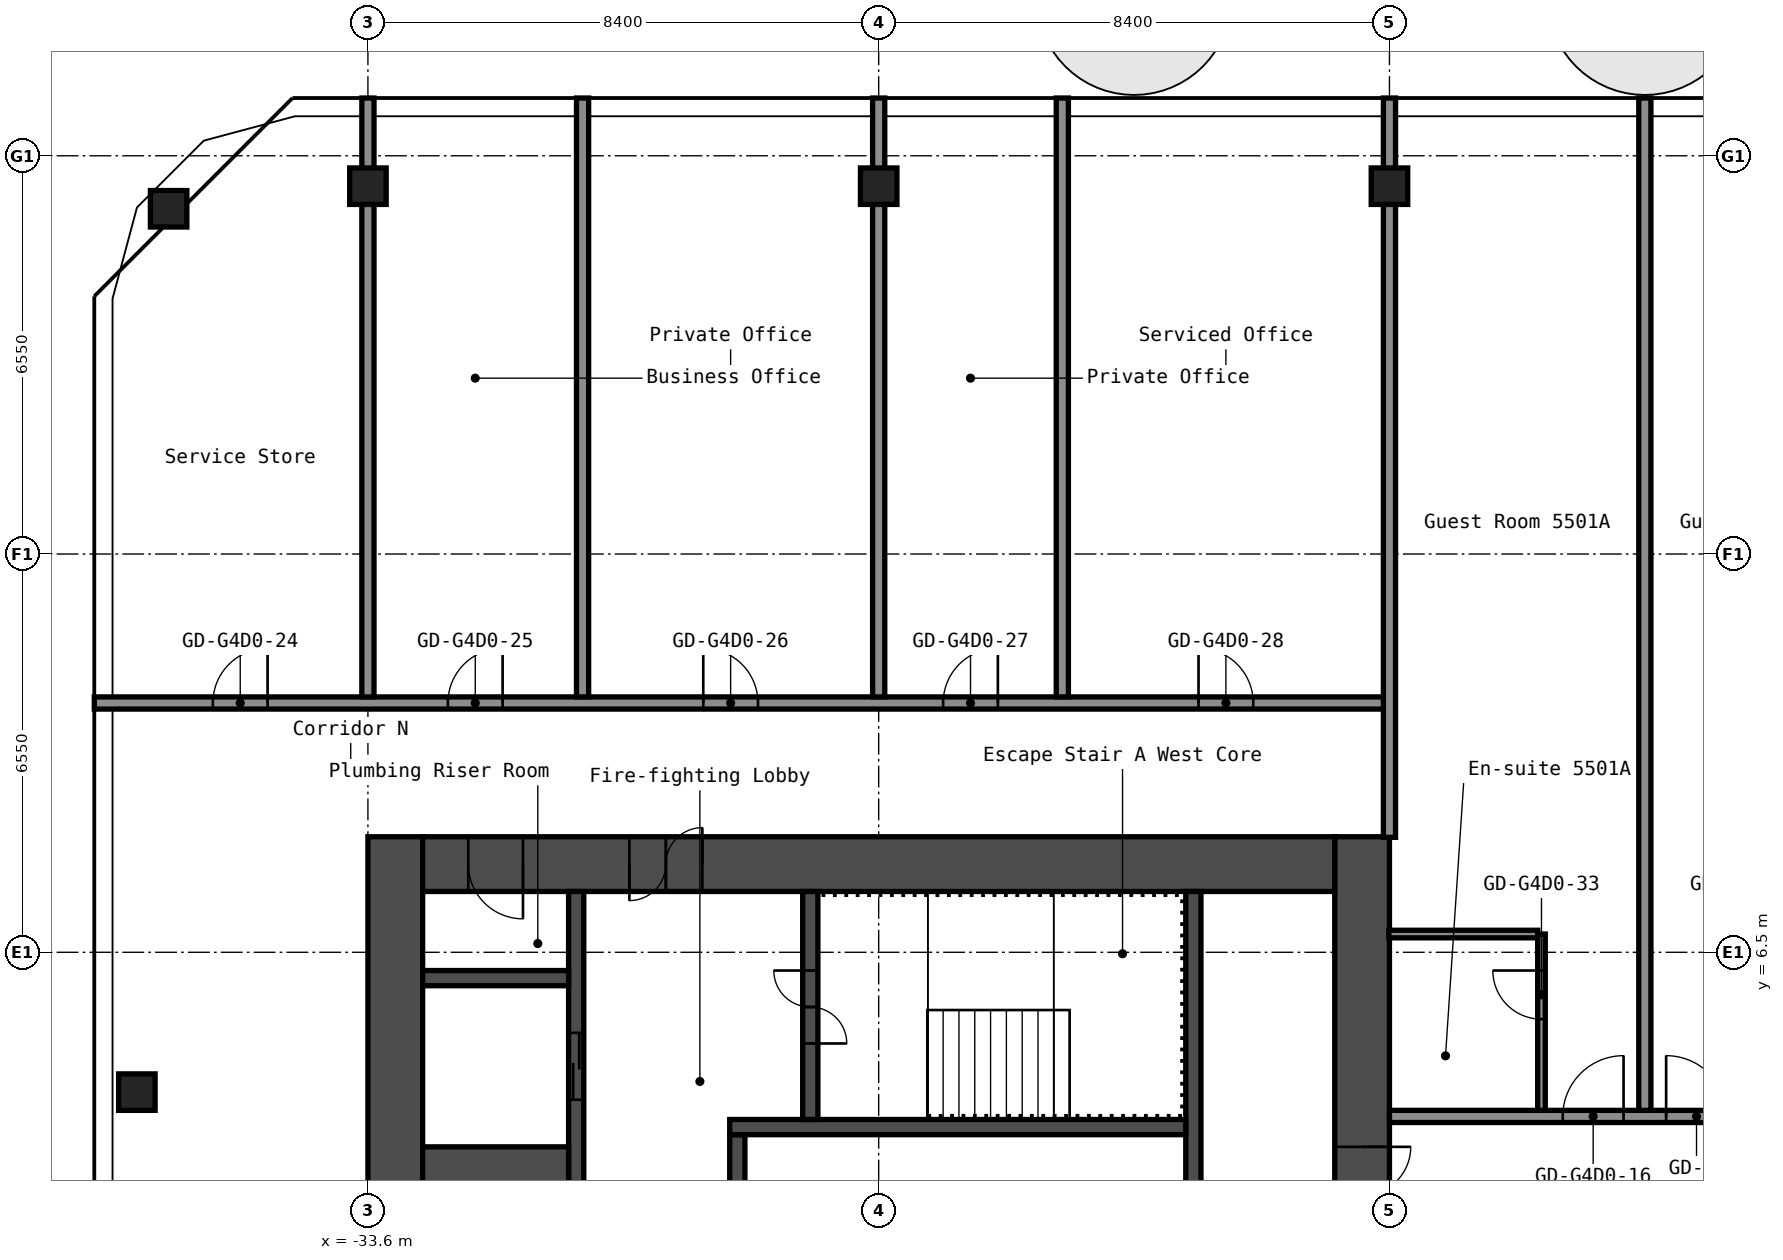
"""IFC4 building model, lengths in metres.
Left out: names, types, materials, properties, quantities, classifications, styles, units other than length and angle.
Written with IfcOpenShell. Run it as: python <this file> out.ifc"""

import sys

from ifc_helpers import new_model, si_unit, direction, frame, frame_2d, origin, origin_2d, place, context, subcontext, project, spatial, rectangle, hollow_rectangle, extrude, element, fill, save


model = new_model("IFC4")
c1 = context("Model", 3, precision=1e-05, world=origin(), true_north=direction((0.0, 1.0)))
c2 = subcontext(c1, "Body", "Model", "MODEL_VIEW")
j1 = project(units=[si_unit("LENGTHUNIT", "METRE"), si_unit("PLANEANGLEUNIT", "RADIAN")], contexts=[c1])
p1 = place(None, origin())
s1 = spatial("IfcSite", under=j1, at=p1, CompositionType="ELEMENT")
p2 = place(p1, origin())
s2 = spatial("IfcBuilding", under=s1, at=p2, CompositionType="ELEMENT")
p3 = place(p2, frame((0.0, 0.0, 196.2)))
s3 = spatial("IfcBuildingStorey", under=s2, at=p3, CompositionType="ELEMENT", Elevation=196.2)
for number, where, z_axis, x_axis in (
    (1, (-37.4, 4.2, 0.0), (0.0, 0.0, 1.0), (1.0, 0.0, 0.0)),
    (2, (-36.878, 18.729, 0.0), (0.0, 0.0, 1.0), (1.0, 0.0, 0.0)),
    (3, (-33.6, 19.1, 0.0), (0.0, 0.0, 1.0), (1.0, 0.0, 0.0)),
    (4, (-25.2, 19.1, 0.0), (0.0, 0.0, 1.0), (1.0, 0.0, 0.0)),
    (5, (-16.8, 19.1, 0.0), (0.0, 0.0, 1.0), (1.0, 0.0, 0.0)),
):
    element("IfcColumn", number, at=place(p3, frame(where, z_axis=z_axis, x_axis=x_axis)), inside=s3, PredefinedType="COLUMN", context=c2, shape_type="SweptSolid", body=[
        extrude(hollow_rectangle(XDim=0.6, YDim=0.6, WallThickness=0.025, InnerFilletRadius=0.038, OuterFilletRadius=0.062, at=origin_2d()), origin(), (0.0, 0.0, 1.0), 2.75),
    ])
p4 = place(p3, frame((-17.25, -8.4, 0.0), z_axis=(0.0, 0.0, 1.0), x_axis=(0.0, 1.0, 0.0)))
e6 = element("IfcWall", 6, at=p4, inside=s3, PredefinedType="SHEAR", context=c2, shape_type="SweptSolid", body=[
    extrude(rectangle(XDim=16.8, YDim=0.9, at=frame_2d((8.4, 0.0))), origin(), (0.0, 0.0, 1.0), 2.75),
])
p5 = place(p4, frame((10.1, 0.0, 0.0)))
e7 = element("IfcOpeningElement", 7, at=p5, cuts=e6, PredefinedType="OPENING", context=c2, shape_type="SweptSolid", body=[
    extrude(rectangle(XDim=1.6, YDim=2.1, at=frame_2d((0.8, 1.05))), frame((0.0, 0.46, 0.0), z_axis=(0.0, -1.0, 0.0), x_axis=(1.0, 0.0, 0.0)), (0.0, 0.0, 1.0), 0.92),
])
p6 = place(p3, frame((-33.15, -8.4, 0.0), z_axis=(0.0, 0.0, 1.0), x_axis=(0.0, 1.0, 0.0)))
e8 = element("IfcWall", 8, at=p6, inside=s3, PredefinedType="SHEAR", context=c2, shape_type="SweptSolid", body=[
    extrude(rectangle(XDim=16.8, YDim=0.9, at=frame_2d((8.4, 0.0))), origin(), (0.0, 0.0, 1.0), 2.75),
])
p7 = place(p3, frame((-32.7, 7.95, 0.0), z_axis=(0.0, 0.0, 1.0), x_axis=(1.0, 0.0, 0.0)))
e9 = element("IfcWall", 9, at=p7, inside=s3, PredefinedType="SHEAR", context=c2, shape_type="SweptSolid", body=[
    extrude(rectangle(XDim=15.0, YDim=0.9, at=frame_2d((7.5, 0.0))), origin(), (0.0, 0.0, 1.0), 2.75),
])
p8 = place(p7, frame((3.4, 0.0, 0.0)))
e10 = element("IfcOpeningElement", 10, at=p8, cuts=e9, PredefinedType="OPENING", context=c2, shape_type="SweptSolid", body=[
    extrude(rectangle(XDim=1.2, YDim=2.1, at=frame_2d((0.6, 1.05))), frame((0.0, 0.46, 0.0), z_axis=(0.0, -1.0, 0.0), x_axis=(1.0, 0.0, 0.0)), (0.0, 0.0, 1.0), 0.92),
])
p9 = place(p7, frame((0.75, 0.0, 0.0)))
e11 = element("IfcOpeningElement", 11, at=p9, cuts=e9, PredefinedType="OPENING", context=c2, shape_type="SweptSolid", body=[
    extrude(rectangle(XDim=0.9, YDim=2.1, at=frame_2d((0.45, 1.05))), frame((0.0, 0.46, 0.0), z_axis=(0.0, -1.0, 0.0), x_axis=(1.0, 0.0, 0.0)), (0.0, 0.0, 1.0), 0.92),
])
p10 = place(p3, frame((-20.025, 1.2, 0.0), z_axis=(0.0, 0.0, 1.0), x_axis=(0.0, 1.0, 0.0)))
e12 = element("IfcWall", 12, at=p10, inside=s3, PredefinedType="SHEAR", context=c2, shape_type="SweptSolid", body=[
    extrude(rectangle(XDim=6.3, YDim=0.25, at=frame_2d((3.15, 0.0))), origin(), (0.0, 0.0, 1.0), 2.75),
])
p11 = place(p3, frame((-27.525, 1.45, 0.0), z_axis=(0.0, 0.0, 1.0), x_axis=(0.0, 1.0, 0.0)))
e13 = element("IfcWall", 13, at=p11, inside=s3, PredefinedType="SHEAR", context=c2, shape_type="SweptSolid", body=[
    extrude(rectangle(XDim=2.05, YDim=0.25, at=frame_2d((1.025, 0.0))), origin(), (0.0, 0.0, 1.0), 2.75),
])
p12 = place(p3, frame((-27.65, 3.625, 0.0), z_axis=(0.0, 0.0, 1.0), x_axis=(1.0, 0.0, 0.0)))
e14 = element("IfcWall", 14, at=p12, inside=s3, PredefinedType="SHEAR", context=c2, shape_type="SweptSolid", body=[
    extrude(rectangle(XDim=7.5, YDim=0.25, at=frame_2d((3.75, 0.0))), origin(), (0.0, 0.0, 1.0), 2.75),
])
p13 = place(p3, frame((-26.325, 3.75, 0.0), z_axis=(0.0, 0.0, 1.0), x_axis=(0.0, 1.0, 0.0)))
e15 = element("IfcWall", 15, at=p13, inside=s3, PredefinedType="SHEAR", context=c2, shape_type="SweptSolid", body=[
    extrude(rectangle(XDim=3.75, YDim=0.25, at=frame_2d((1.875, 0.0))), origin(), (0.0, 0.0, 1.0), 2.75),
])
p14 = place(p13, frame((1.25, 0.0, 0.0)))
e16 = element("IfcOpeningElement", 16, at=p14, cuts=e15, PredefinedType="OPENING", context=c2, shape_type="SweptSolid", body=[
    extrude(rectangle(XDim=1.2, YDim=2.1, at=frame_2d((0.6, 1.05))), frame((0.0, 0.135, 0.0), z_axis=(0.0, -1.0, 0.0), x_axis=(1.0, 0.0, 0.0)), (0.0, 0.0, 1.0), 0.27),
])
p15 = place(p3, frame((-30.175, 1.45, 0.0), z_axis=(0.0, 0.0, 1.0), x_axis=(0.0, 1.0, 0.0)))
e17 = element("IfcWall", 17, at=p15, inside=s3, PredefinedType="SHEAR", context=c2, shape_type="SweptSolid", body=[
    extrude(rectangle(XDim=6.05, YDim=0.25, at=frame_2d((3.025, 0.0))), origin(), (0.0, 0.0, 1.0), 2.75),
])
p16 = place(p15, frame((2.625, 0.0, 0.0)))
e18 = element("IfcOpeningElement", 18, at=p16, cuts=e17, PredefinedType="OPENING", context=c2, shape_type="SweptSolid", body=[
    extrude(rectangle(XDim=1.1, YDim=2.1, at=frame_2d((0.55, 1.05))), frame((0.0, 0.135, 0.0), z_axis=(0.0, -1.0, 0.0), x_axis=(1.0, 0.0, 0.0)), (0.0, 0.0, 1.0), 0.27),
])
p17 = place(p3, frame((-32.7, 2.375, 0.0), z_axis=(0.0, 0.0, 1.0), x_axis=(1.0, 0.0, 0.0)))
e19 = element("IfcWall", 19, at=p17, inside=s3, PredefinedType="SHEAR", context=c2, shape_type="SweptSolid", body=[
    extrude(rectangle(XDim=2.4, YDim=1.85, at=frame_2d((1.2, 0.0))), origin(), (0.0, 0.0, 1.0), 2.75),
])
p18 = place(p3, frame((-32.7, 6.075, 0.0), z_axis=(0.0, 0.0, 1.0), x_axis=(1.0, 0.0, 0.0)))
e20 = element("IfcWall", 20, at=p18, inside=s3, PredefinedType="SHEAR", context=c2, shape_type="SweptSolid", body=[
    extrude(rectangle(XDim=2.4, YDim=0.25, at=frame_2d((1.2, 0.0))), origin(), (0.0, 0.0, 1.0), 2.75),
])
p19 = place(p3, frame((-16.8, 3.8, 0.0), z_axis=(0.0, 0.0, 1.0), x_axis=(1.0, 0.0, 0.0)))
e21 = element("IfcWall", 21, at=p19, inside=s3, PredefinedType="PARTITIONING", context=c2, shape_type="SweptSolid", body=[
    extrude(rectangle(XDim=33.6, YDim=0.2, at=frame_2d((16.8, 0.0))), origin(), (0.0, 0.0, 1.0), 2.75),
])
p20 = place(p19, frame((2.85, 0.0, 0.0)))
e22 = element("IfcOpeningElement", 22, at=p20, cuts=e21, PredefinedType="OPENING", context=c2, shape_type="SweptSolid", body=[
    extrude(rectangle(XDim=1.0, YDim=2.1, at=frame_2d((0.5, 1.05))), frame((0.0, 0.11, 0.0), z_axis=(0.0, -1.0, 0.0), x_axis=(1.0, 0.0, 0.0)), (0.0, 0.0, 1.0), 0.22),
])
p21 = place(p19, frame((4.55, 0.0, 0.0)))
e23 = element("IfcOpeningElement", 23, at=p21, cuts=e21, PredefinedType="OPENING", context=c2, shape_type="SweptSolid", body=[
    extrude(rectangle(XDim=1.0, YDim=2.1, at=frame_2d((0.5, 1.05))), frame((0.0, 0.11, 0.0), z_axis=(0.0, -1.0, 0.0), x_axis=(1.0, 0.0, 0.0)), (0.0, 0.0, 1.0), 0.22),
])
p22 = place(p19, frame((10.4, 0.0, 0.0)))
e24 = element("IfcOpeningElement", 24, at=p22, cuts=e21, PredefinedType="OPENING", context=c2, shape_type="SweptSolid", body=[
    extrude(rectangle(XDim=1.0, YDim=2.1, at=frame_2d((0.5, 1.05))), frame((0.0, 0.11, 0.0), z_axis=(0.0, -1.0, 0.0), x_axis=(1.0, 0.0, 0.0)), (0.0, 0.0, 1.0), 0.22),
])
p23 = place(p19, frame((19.65, 0.0, 0.0)))
e25 = element("IfcOpeningElement", 25, at=p23, cuts=e21, PredefinedType="OPENING", context=c2, shape_type="SweptSolid", body=[
    extrude(rectangle(XDim=1.0, YDim=2.1, at=frame_2d((0.5, 1.05))), frame((0.0, 0.11, 0.0), z_axis=(0.0, -1.0, 0.0), x_axis=(1.0, 0.0, 0.0)), (0.0, 0.0, 1.0), 0.22),
])
p24 = place(p19, frame((21.35, 0.0, 0.0)))
e26 = element("IfcOpeningElement", 26, at=p24, cuts=e21, PredefinedType="OPENING", context=c2, shape_type="SweptSolid", body=[
    extrude(rectangle(XDim=1.0, YDim=2.1, at=frame_2d((0.5, 1.05))), frame((0.0, 0.11, 0.0), z_axis=(0.0, -1.0, 0.0), x_axis=(1.0, 0.0, 0.0)), (0.0, 0.0, 1.0), 0.22),
])
p25 = place(p19, frame((30.6, 0.0, 0.0)))
e27 = element("IfcOpeningElement", 27, at=p25, cuts=e21, PredefinedType="OPENING", context=c2, shape_type="SweptSolid", body=[
    extrude(rectangle(XDim=1.0, YDim=2.1, at=frame_2d((0.5, 1.05))), frame((0.0, 0.11, 0.0), z_axis=(0.0, -1.0, 0.0), x_axis=(1.0, 0.0, 0.0)), (0.0, 0.0, 1.0), 0.22),
])
p26 = place(p3, frame((-16.81, 6.8, 0.0), z_axis=(0.0, 0.0, 1.0), x_axis=(1.0, 0.0, 0.0)))
e28 = element("IfcWall", 28, at=p26, inside=s3, PredefinedType="PARTITIONING", context=c2, shape_type="SweptSolid", body=[
    extrude(rectangle(XDim=2.448, YDim=0.125, at=frame_2d((1.224, 0.0))), origin(), (0.0, 0.0, 1.0), 2.75),
])
p27 = place(p3, frame((-38.1, 10.6, 0.0), z_axis=(0.0, 0.0, 1.0), x_axis=(1.0, 0.0, 0.0)))
e29 = element("IfcWall", 29, at=p27, inside=s3, PredefinedType="PARTITIONING", context=c2, shape_type="SweptSolid", body=[
    extrude(rectangle(XDim=21.3, YDim=0.2, at=frame_2d((10.65, 0.0))), origin(), (0.0, 0.0, 1.0), 2.75),
])
p28 = place(p27, frame((1.95, 0.0, 0.0)))
e30 = element("IfcOpeningElement", 30, at=p28, cuts=e29, PredefinedType="OPENING", context=c2, shape_type="SweptSolid", body=[
    extrude(rectangle(XDim=0.9, YDim=2.1, at=frame_2d((0.45, 1.05))), frame((0.0, 0.11, 0.0), z_axis=(0.0, -1.0, 0.0), x_axis=(1.0, 0.0, 0.0)), (0.0, 0.0, 1.0), 0.22),
])
p29 = place(p27, frame((5.815, 0.0, 0.0)))
e31 = element("IfcOpeningElement", 31, at=p29, cuts=e29, PredefinedType="OPENING", context=c2, shape_type="SweptSolid", body=[
    extrude(rectangle(XDim=0.9, YDim=2.1, at=frame_2d((0.45, 1.05))), frame((0.0, 0.11, 0.0), z_axis=(0.0, -1.0, 0.0), x_axis=(1.0, 0.0, 0.0)), (0.0, 0.0, 1.0), 0.22),
])
p30 = place(p27, frame((10.015, 0.0, 0.0)))
e32 = element("IfcOpeningElement", 32, at=p30, cuts=e29, PredefinedType="OPENING", context=c2, shape_type="SweptSolid", body=[
    extrude(rectangle(XDim=0.9, YDim=2.1, at=frame_2d((0.45, 1.05))), frame((0.0, 0.11, 0.0), z_axis=(0.0, -1.0, 0.0), x_axis=(1.0, 0.0, 0.0)), (0.0, 0.0, 1.0), 0.22),
])
p31 = place(p27, frame((13.96, 0.0, 0.0)))
e33 = element("IfcOpeningElement", 33, at=p31, cuts=e29, PredefinedType="OPENING", context=c2, shape_type="SweptSolid", body=[
    extrude(rectangle(XDim=0.9, YDim=2.1, at=frame_2d((0.45, 1.05))), frame((0.0, 0.11, 0.0), z_axis=(0.0, -1.0, 0.0), x_axis=(1.0, 0.0, 0.0)), (0.0, 0.0, 1.0), 0.22),
])
p32 = place(p27, frame((18.16, 0.0, 0.0)))
e34 = element("IfcOpeningElement", 34, at=p32, cuts=e29, PredefinedType="OPENING", context=c2, shape_type="SweptSolid", body=[
    extrude(rectangle(XDim=0.9, YDim=2.1, at=frame_2d((0.45, 1.05))), frame((0.0, 0.11, 0.0), z_axis=(0.0, -1.0, 0.0), x_axis=(1.0, 0.0, 0.0)), (0.0, 0.0, 1.0), 0.22),
])
for number, where, z_axis, x_axis in (
    (35, (-33.6, 10.7, 0.0), (0.0, 0.0, 1.0), (0.0, 1.0, 0.0)),
    (36, (-30.07, 10.7, 0.0), (0.0, 0.0, 1.0), (0.0, 1.0, 0.0)),
    (37, (-25.2, 10.7, 0.0), (0.0, 0.0, 1.0), (0.0, 1.0, 0.0)),
    (38, (-22.18, 10.7, 0.0), (0.0, 0.0, 1.0), (0.0, 1.0, 0.0)),
):
    element("IfcWall", number, at=place(p3, frame(where, z_axis=z_axis, x_axis=x_axis)), inside=s3, PredefinedType="PARTITIONING", context=c2, shape_type="SweptSolid", body=[
        extrude(rectangle(XDim=9.85, YDim=0.2, at=frame_2d((4.925, 0.0))), origin(), (0.0, 0.0, 1.0), 2.75),
    ])
p33 = place(p3, frame((-16.8, 8.39, 0.0), z_axis=(0.0, 0.0, 1.0), x_axis=(0.0, 1.0, 0.0)))
e39 = element("IfcWall", 39, at=p33, inside=s3, PredefinedType="PARTITIONING", context=c2, shape_type="SweptSolid", body=[
    extrude(rectangle(XDim=12.16, YDim=0.2, at=frame_2d((6.08, 0.0))), origin(), (0.0, 0.0, 1.0), 2.75),
])
p34 = place(p3, frame((-14.3, 3.9, 0.0), z_axis=(0.0, 0.0, 1.0), x_axis=(0.0, 1.0, 0.0)))
e40 = element("IfcWall", 40, at=p34, inside=s3, PredefinedType="PARTITIONING", context=c2, shape_type="SweptSolid", body=[
    extrude(rectangle(XDim=2.9, YDim=0.125, at=frame_2d((1.45, 0.0))), origin(), (0.0, 0.0, 1.0), 2.75),
])
p35 = place(p34, frame((1.5, 0.0, 0.0)))
e41 = element("IfcOpeningElement", 41, at=p35, cuts=e40, PredefinedType="OPENING", context=c2, shape_type="SweptSolid", body=[
    extrude(rectangle(XDim=0.8, YDim=2.1, at=frame_2d((0.4, 1.05))), frame((0.0, 0.073, 0.0), z_axis=(0.0, -1.0, 0.0), x_axis=(1.0, 0.0, 0.0)), (0.0, 0.0, 1.0), 0.145),
])
p36 = place(p3, frame((-12.6, 3.9, 0.0), z_axis=(0.0, 0.0, 1.0), x_axis=(0.0, 1.0, 0.0)))
e42 = element("IfcWall", 42, at=p36, inside=s3, PredefinedType="PARTITIONING", context=c2, shape_type="SweptSolid", body=[
    extrude(rectangle(XDim=16.65, YDim=0.2, at=frame_2d((8.325, 0.0))), origin(), (0.0, 0.0, 1.0), 2.75),
])
p37 = place(p5, origin())
e43 = element("IfcDoor", 43, at=p37, inside=s3, OperationType="DOUBLE_DOOR_SINGLE_SWING", PredefinedType="DOOR", context=c2, shape_type="SweptSolid", body=[
    extrude(rectangle(XDim=1.6, YDim=2.1, at=frame_2d((0.8, 1.05))), frame((0.0, 0.025, 0.0), z_axis=(0.0, -1.0, 0.0), x_axis=(1.0, 0.0, 0.0)), (0.0, 0.0, 1.0), 0.05),
])
fill(e7, e43)
p38 = place(p8, origin())
e44 = element("IfcDoor", 44, at=p38, inside=s3, OperationType="DOUBLE_DOOR_SINGLE_SWING", PredefinedType="DOOR", context=c2, shape_type="SweptSolid", body=[
    extrude(rectangle(XDim=1.2, YDim=2.1, at=frame_2d((0.6, 1.05))), frame((0.0, 0.025, 0.0), z_axis=(0.0, -1.0, 0.0), x_axis=(1.0, 0.0, 0.0)), (0.0, 0.0, 1.0), 0.05),
])
fill(e10, e44)
p39 = place(p9, origin())
e45 = element("IfcDoor", 45, at=p39, inside=s3, OperationType="SINGLE_SWING_RIGHT", PredefinedType="DOOR", context=c2, shape_type="SweptSolid", body=[
    extrude(rectangle(XDim=0.9, YDim=2.1, at=frame_2d((0.45, 1.05))), frame((0.0, 0.025, 0.0), z_axis=(0.0, -1.0, 0.0), x_axis=(1.0, 0.0, 0.0)), (0.0, 0.0, 1.0), 0.05),
])
fill(e11, e45)
p40 = place(p14, origin())
e46 = element("IfcDoor", 46, at=p40, inside=s3, OperationType="DOUBLE_DOOR_SINGLE_SWING", PredefinedType="DOOR", context=c2, shape_type="SweptSolid", body=[
    extrude(rectangle(XDim=1.2, YDim=2.1, at=frame_2d((0.6, 1.05))), frame((0.0, 0.025, 0.0), z_axis=(0.0, -1.0, 0.0), x_axis=(1.0, 0.0, 0.0)), (0.0, 0.0, 1.0), 0.05),
])
fill(e16, e46)
p41 = place(p16, origin())
e47 = element("IfcDoor", 47, at=p41, inside=s3, OperationType="DOUBLE_DOOR_SLIDING", PredefinedType="DOOR", context=c2, shape_type="SweptSolid", body=[
    extrude(rectangle(XDim=1.1, YDim=2.1, at=frame_2d((0.55, 1.05))), frame((0.0, 0.025, 0.0), z_axis=(0.0, -1.0, 0.0), x_axis=(1.0, 0.0, 0.0)), (0.0, 0.0, 1.0), 0.05),
])
fill(e18, e47)
p42 = place(p20, origin())
e48 = element("IfcDoor", 48, at=p42, inside=s3, OperationType="SINGLE_SWING_LEFT", PredefinedType="DOOR", context=c2, shape_type="SweptSolid", body=[
    extrude(rectangle(XDim=1.0, YDim=2.1, at=frame_2d((0.5, 1.05))), frame((0.0, 0.025, 0.0), z_axis=(0.0, -1.0, 0.0), x_axis=(1.0, 0.0, 0.0)), (0.0, 0.0, 1.0), 0.05),
])
fill(e22, e48)
p43 = place(p21, origin())
e49 = element("IfcDoor", 49, at=p43, inside=s3, OperationType="SINGLE_SWING_RIGHT", PredefinedType="DOOR", context=c2, shape_type="SweptSolid", body=[
    extrude(rectangle(XDim=1.0, YDim=2.1, at=frame_2d((0.5, 1.05))), frame((0.0, 0.025, 0.0), z_axis=(0.0, -1.0, 0.0), x_axis=(1.0, 0.0, 0.0)), (0.0, 0.0, 1.0), 0.05),
])
fill(e23, e49)
p44 = place(p28, origin())
e50 = element("IfcDoor", 50, at=p44, inside=s3, OperationType="SINGLE_SWING_LEFT", PredefinedType="DOOR", context=c2, shape_type="SweptSolid", body=[
    extrude(rectangle(XDim=0.9, YDim=2.1, at=frame_2d((0.45, 1.05))), frame((0.0, 0.025, 0.0), z_axis=(0.0, -1.0, 0.0), x_axis=(1.0, 0.0, 0.0)), (0.0, 0.0, 1.0), 0.05),
])
fill(e30, e50)
p45 = place(p29, origin())
e51 = element("IfcDoor", 51, at=p45, inside=s3, OperationType="SINGLE_SWING_LEFT", PredefinedType="DOOR", context=c2, shape_type="SweptSolid", body=[
    extrude(rectangle(XDim=0.9, YDim=2.1, at=frame_2d((0.45, 1.05))), frame((0.0, 0.025, 0.0), z_axis=(0.0, -1.0, 0.0), x_axis=(1.0, 0.0, 0.0)), (0.0, 0.0, 1.0), 0.05),
])
fill(e31, e51)
p46 = place(p30, origin())
e52 = element("IfcDoor", 52, at=p46, inside=s3, OperationType="SINGLE_SWING_RIGHT", PredefinedType="DOOR", context=c2, shape_type="SweptSolid", body=[
    extrude(rectangle(XDim=0.9, YDim=2.1, at=frame_2d((0.45, 1.05))), frame((0.0, 0.025, 0.0), z_axis=(0.0, -1.0, 0.0), x_axis=(1.0, 0.0, 0.0)), (0.0, 0.0, 1.0), 0.05),
])
fill(e32, e52)
p47 = place(p31, origin())
e53 = element("IfcDoor", 53, at=p47, inside=s3, OperationType="SINGLE_SWING_LEFT", PredefinedType="DOOR", context=c2, shape_type="SweptSolid", body=[
    extrude(rectangle(XDim=0.9, YDim=2.1, at=frame_2d((0.45, 1.05))), frame((0.0, 0.025, 0.0), z_axis=(0.0, -1.0, 0.0), x_axis=(1.0, 0.0, 0.0)), (0.0, 0.0, 1.0), 0.05),
])
fill(e33, e53)
p48 = place(p32, origin())
e54 = element("IfcDoor", 54, at=p48, inside=s3, OperationType="SINGLE_SWING_RIGHT", PredefinedType="DOOR", context=c2, shape_type="SweptSolid", body=[
    extrude(rectangle(XDim=0.9, YDim=2.1, at=frame_2d((0.45, 1.05))), frame((0.0, 0.025, 0.0), z_axis=(0.0, -1.0, 0.0), x_axis=(1.0, 0.0, 0.0)), (0.0, 0.0, 1.0), 0.05),
])
fill(e34, e54)
p49 = place(p35, origin())
e55 = element("IfcDoor", 55, at=p49, inside=s3, OperationType="SINGLE_SWING_LEFT", PredefinedType="DOOR", context=c2, shape_type="SweptSolid", body=[
    extrude(rectangle(XDim=0.8, YDim=2.1, at=frame_2d((0.4, 1.05))), frame((0.0, 0.025, 0.0), z_axis=(0.0, -1.0, 0.0), x_axis=(1.0, 0.0, 0.0)), (0.0, 0.0, 1.0), 0.05),
])
fill(e41, e55)
save(model, sys.argv[1])
